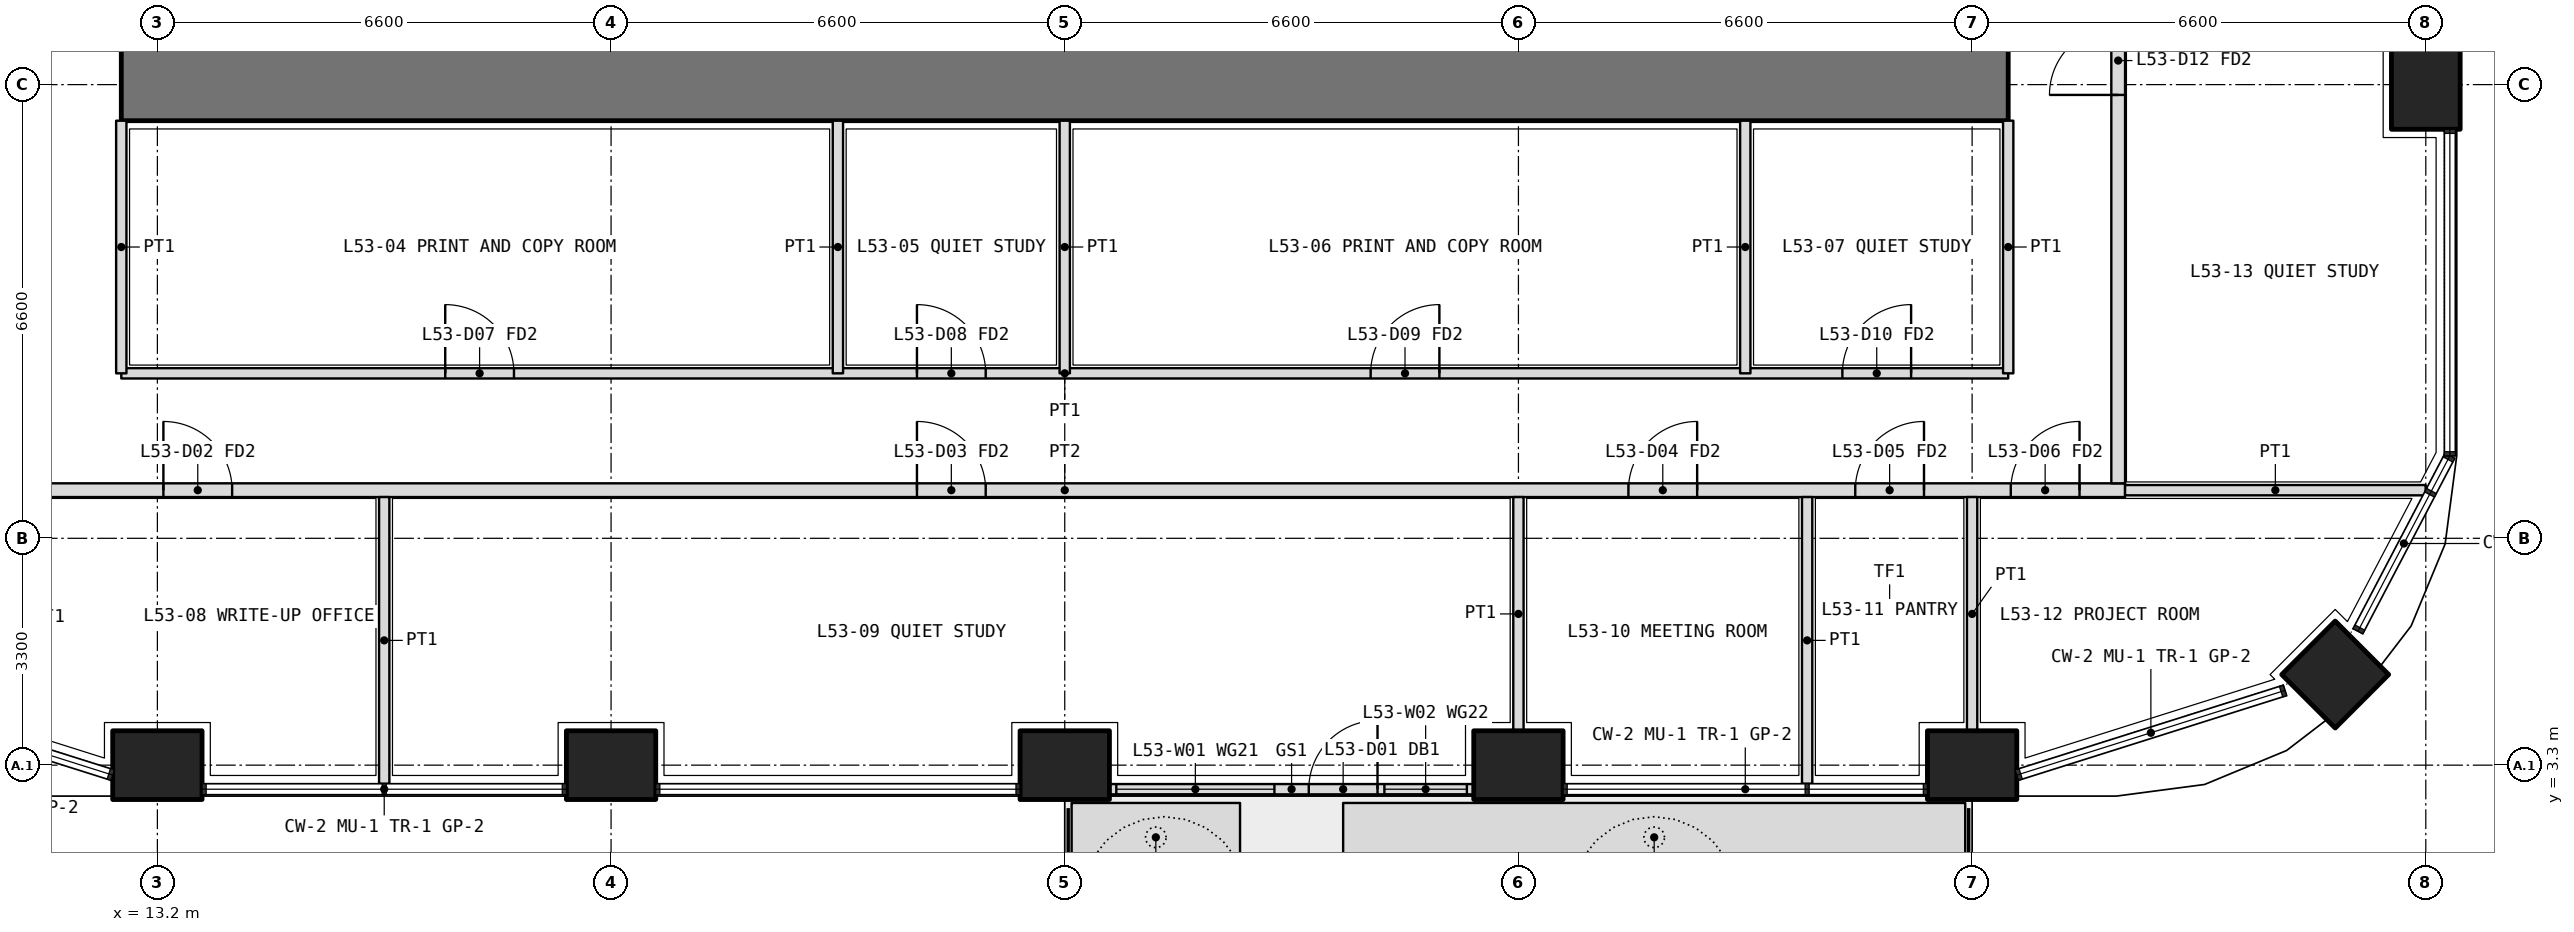
"""IFC4 building model, lengths in metres.
Left out: names, types, materials, properties, quantities, classifications, styles, units other than length and angle.
Written with IfcOpenShell. Run it as: python <this file> out.ifc"""

import sys

from ifc_helpers import new_model, si_unit, direction, frame, frame_2d, origin, origin_2d, place, context, subcontext, project, spatial, polyline, rectangle, outline, extrude, element, fill, save


model = new_model("IFC4")
c1 = context("Model", 3, precision=1e-05, world=origin(), true_north=direction((0.0, 1.0)))
c2 = subcontext(c1, "Body", "Model", "MODEL_VIEW")
j1 = project(units=[si_unit("LENGTHUNIT", "METRE"), si_unit("PLANEANGLEUNIT", "RADIAN")], contexts=[c1])
p1 = place(None, origin())
s1 = spatial("IfcSite", under=j1, at=p1, CompositionType="ELEMENT")
p2 = place(p1, origin())
s2 = spatial("IfcBuilding", under=s1, at=p2, CompositionType="ELEMENT")
p3 = place(p2, frame((0.0, 0.0, 233.4)))
s3 = spatial("IfcBuildingStorey", under=s2, at=p3, CompositionType="ELEMENT", Elevation=233.4)
p4 = place(p3, frame((44.882, 4.618, 0.0), z_axis=(0.0, 0.0, 1.0), x_axis=(0.707106781187, 0.707106781187, 0.0)))
e1 = element("IfcColumn", 1, at=p4, inside=s3, PredefinedType="COLUMN", context=c2, shape_type="SweptSolid", body=[
    extrude(rectangle(XDim=1.1, YDim=1.1, at=origin_2d()), origin(), (0.0, 0.0, 1.0), 4.2),
])
for number, where, z_axis, x_axis in (
    (2, (13.2, 3.3, 0.0), (0.0, 0.0, 1.0), (1.0, 0.0, 0.0)),
    (3, (19.8, 3.3, 0.0), (0.0, 0.0, 1.0), (1.0, 0.0, 0.0)),
    (4, (26.4, 3.3, 0.0), (0.0, 0.0, 1.0), (1.0, 0.0, 0.0)),
    (5, (33.0, 3.3, 0.0), (0.0, 0.0, 1.0), (1.0, 0.0, 0.0)),
    (6, (39.6, 3.3, 0.0), (0.0, 0.0, 1.0), (1.0, 0.0, 0.0)),
    (7, (46.2, 13.2, 0.0), (0.0, 0.0, 1.0), (0.0, 1.0, 0.0)),
):
    element("IfcColumn", number, at=place(p3, frame(where, z_axis=z_axis, x_axis=x_axis)), inside=s3, PredefinedType="COLUMN", context=c2, shape_type="SweptSolid", body=[
        extrude(rectangle(XDim=1.3, YDim=1.0, at=origin_2d()), origin(), (0.0, 0.0, 1.0), 4.2),
    ])
p5 = place(p3, origin())
e8 = element("IfcWall", 8, at=p5, inside=s3, PredefinedType="USERDEFINED", context=c2, shape_type="SweptSolid", body=[
    extrude(outline(polyline([(26.5, 1.75), (28.95, 1.75), (28.95, 2.75), (26.5, 2.75), (26.5, 1.75)]), holes=[polyline([(26.65, 1.9), (28.8, 1.9), (28.8, 2.6), (26.65, 2.6), (26.65, 1.9)])]), origin(), (0.0, 0.0, 1.0), 1.05),
])
p6 = place(p3, origin())
e9 = element("IfcWall", 9, at=p6, inside=s3, PredefinedType="USERDEFINED", context=c2, shape_type="SweptSolid", body=[
    extrude(outline(polyline([(30.45, 1.75), (39.5, 1.75), (39.5, 2.75), (30.45, 2.75), (30.45, 1.75)]), holes=[polyline([(30.6, 1.9), (39.35, 1.9), (39.35, 2.6), (30.6, 2.6), (30.6, 1.9)])]), origin(), (0.0, 0.0, 1.0), 1.05),
])
p7 = place(p3, frame((27.05, 2.95, 0.0), z_axis=(0.0, 0.0, 1.0), x_axis=(1.0, 0.0, 0.0)))
e10 = element("IfcWall", 10, at=p7, inside=s3, PredefinedType="SOLIDWALL", context=c2, shape_type="SweptSolid", body=[
    extrude(rectangle(XDim=5.3, YDim=0.15, at=frame_2d((2.65, 0.0))), origin(), (0.0, 0.0, 1.0), 2.7),
])
p8 = place(p7, frame((2.9, 0.0, 0.0)))
e11 = element("IfcOpeningElement", 11, at=p8, cuts=e10, PredefinedType="OPENING", context=c2, shape_type="SweptSolid", body=[
    extrude(rectangle(XDim=1.0, YDim=2.4, at=frame_2d((0.5, 1.2))), frame((0.0, 0.085, 0.0), z_axis=(0.0, -1.0, 0.0), x_axis=(1.0, 0.0, 0.0)), (0.0, 0.0, 1.0), 0.17),
])
p9 = place(p7, frame((0.1, 0.0, 0.1)))
e12 = element("IfcOpeningElement", 12, at=p9, cuts=e10, PredefinedType="OPENING", context=c2, shape_type="SweptSolid", body=[
    extrude(rectangle(XDim=2.3, YDim=2.3, at=frame_2d((1.15, 1.15))), frame((0.0, 0.085, 0.0), z_axis=(0.0, -1.0, 0.0), x_axis=(1.0, 0.0, 0.0)), (0.0, 0.0, 1.0), 0.17),
])
p10 = place(p7, frame((4.0, 0.0, 0.1)))
e13 = element("IfcOpeningElement", 13, at=p10, cuts=e10, PredefinedType="OPENING", context=c2, shape_type="SweptSolid", body=[
    extrude(rectangle(XDim=1.2, YDim=2.3, at=frame_2d((0.6, 1.15))), frame((0.0, 0.085, 0.0), z_axis=(0.0, -1.0, 0.0), x_axis=(1.0, 0.0, 0.0)), (0.0, 0.0, 1.0), 0.17),
])
p11 = place(p3, frame((12.675, 13.2, 0.0), z_axis=(0.0, 0.0, 1.0), x_axis=(1.0, 0.0, 0.0)))
e14 = element("IfcWall", 14, at=p11, inside=s3, PredefinedType="SHEAR", context=c2, shape_type="SweptSolid", body=[
    extrude(rectangle(XDim=27.45, YDim=1.05, at=frame_2d((13.725, 0.0))), origin(), (0.0, 0.0, 1.0), 4.2),
])
p12 = place(p3, frame((12.675, 9.0, 0.0), z_axis=(0.0, 0.0, 1.0), x_axis=(1.0, 0.0, 0.0)))
e15 = element("IfcWall", 15, at=p12, inside=s3, PredefinedType="PARTITIONING", context=c2, shape_type="SweptSolid", body=[
    extrude(rectangle(XDim=27.45, YDim=0.15, at=frame_2d((13.725, 0.0))), origin(), (0.0, 0.0, 1.0), 3.0),
])
p13 = place(p12, frame((4.712, 0.0, 0.0)))
e16 = element("IfcOpeningElement", 16, at=p13, cuts=e15, PredefinedType="OPENING", context=c2, shape_type="SweptSolid", body=[
    extrude(rectangle(XDim=1.0, YDim=2.1, at=frame_2d((0.5, 1.05))), frame((0.0, 0.085, 0.0), z_axis=(0.0, -1.0, 0.0), x_axis=(1.0, 0.0, 0.0)), (0.0, 0.0, 1.0), 0.17),
])
p14 = place(p12, frame((11.575, 0.0, 0.0)))
e17 = element("IfcOpeningElement", 17, at=p14, cuts=e15, PredefinedType="OPENING", context=c2, shape_type="SweptSolid", body=[
    extrude(rectangle(XDim=1.0, YDim=2.1, at=frame_2d((0.5, 1.05))), frame((0.0, 0.085, 0.0), z_axis=(0.0, -1.0, 0.0), x_axis=(1.0, 0.0, 0.0)), (0.0, 0.0, 1.0), 0.17),
])
p15 = place(p12, frame((18.175, 0.0, 0.0)))
e18 = element("IfcOpeningElement", 18, at=p15, cuts=e15, PredefinedType="OPENING", context=c2, shape_type="SweptSolid", body=[
    extrude(rectangle(XDim=1.0, YDim=2.1, at=frame_2d((0.5, 1.05))), frame((0.0, 0.085, 0.0), z_axis=(0.0, -1.0, 0.0), x_axis=(1.0, 0.0, 0.0)), (0.0, 0.0, 1.0), 0.17),
])
p16 = place(p12, frame((25.038, 0.0, 0.0)))
e19 = element("IfcOpeningElement", 19, at=p16, cuts=e15, PredefinedType="OPENING", context=c2, shape_type="SweptSolid", body=[
    extrude(rectangle(XDim=1.0, YDim=2.1, at=frame_2d((0.5, 1.05))), frame((0.0, 0.085, 0.0), z_axis=(0.0, -1.0, 0.0), x_axis=(1.0, 0.0, 0.0)), (0.0, 0.0, 1.0), 0.17),
])
for number, where, z_axis, x_axis in (
    (20, (12.675, 12.675, 0.0), (0.0, 0.0, 1.0), (0.0, -1.0, 0.0)),
    (21, (40.125, 12.675, 0.0), (0.0, 0.0, 1.0), (0.0, -1.0, 0.0)),
):
    element("IfcWall", number, at=place(p3, frame(where, z_axis=z_axis, x_axis=x_axis)), inside=s3, PredefinedType="PARTITIONING", context=c2, shape_type="SweptSolid", body=[
        extrude(rectangle(XDim=3.675, YDim=0.15, at=frame_2d((1.837, 0.0))), origin(), (0.0, 0.0, 1.0), 3.0),
    ])
p17 = place(p3, frame((23.1, 12.675, 0.0), z_axis=(0.0, 0.0, 1.0), x_axis=(0.0, -1.0, 0.0)))
e22 = element("IfcWall", 22, at=p17, inside=s3, PredefinedType="PARTITIONING", context=c2, shape_type="SweptSolid", body=[
    extrude(rectangle(XDim=3.675, YDim=0.15, at=frame_2d((1.837, 0.0))), origin(), (0.0, 0.0, 1.0), 3.9),
])
p18 = place(p3, frame((26.4, 12.675, 0.0), z_axis=(0.0, 0.0, 1.0), x_axis=(0.0, -1.0, 0.0)))
e23 = element("IfcWall", 23, at=p18, inside=s3, PredefinedType="PARTITIONING", context=c2, shape_type="SweptSolid", body=[
    extrude(rectangle(XDim=3.675, YDim=0.15, at=frame_2d((1.837, 0.0))), origin(), (0.0, 0.0, 1.0), 3.0),
])
p19 = place(p3, frame((36.3, 12.675, 0.0), z_axis=(0.0, 0.0, 1.0), x_axis=(0.0, -1.0, 0.0)))
e24 = element("IfcWall", 24, at=p19, inside=s3, PredefinedType="PARTITIONING", context=c2, shape_type="SweptSolid", body=[
    extrude(rectangle(XDim=3.675, YDim=0.15, at=frame_2d((1.837, 0.0))), origin(), (0.0, 0.0, 1.0), 3.9),
])
p20 = place(p3, frame((10.975, 7.3, 0.0), z_axis=(0.0, 0.0, 1.0), x_axis=(1.0, 0.0, 0.0)))
e25 = element("IfcWall", 25, at=p20, inside=s3, PredefinedType="PARTITIONING", context=c2, shape_type="SweptSolid", body=[
    extrude(rectangle(XDim=30.85, YDim=0.2, at=frame_2d((15.425, 0.0))), origin(), (0.0, 0.0, 1.0), 3.0),
])
p21 = place(p20, frame((2.312, 0.0, 0.0)))
e26 = element("IfcOpeningElement", 26, at=p21, cuts=e25, PredefinedType="OPENING", context=c2, shape_type="SweptSolid", body=[
    extrude(rectangle(XDim=1.0, YDim=2.1, at=frame_2d((0.5, 1.05))), frame((0.0, 0.11, 0.0), z_axis=(0.0, -1.0, 0.0), x_axis=(1.0, 0.0, 0.0)), (0.0, 0.0, 1.0), 0.22),
])
p22 = place(p20, frame((13.275, 0.0, 0.0)))
e27 = element("IfcOpeningElement", 27, at=p22, cuts=e25, PredefinedType="OPENING", context=c2, shape_type="SweptSolid", body=[
    extrude(rectangle(XDim=1.0, YDim=2.1, at=frame_2d((0.5, 1.05))), frame((0.0, 0.11, 0.0), z_axis=(0.0, -1.0, 0.0), x_axis=(1.0, 0.0, 0.0)), (0.0, 0.0, 1.0), 0.22),
])
p23 = place(p20, frame((23.625, 0.0, 0.0)))
e28 = element("IfcOpeningElement", 28, at=p23, cuts=e25, PredefinedType="OPENING", context=c2, shape_type="SweptSolid", body=[
    extrude(rectangle(XDim=1.0, YDim=2.1, at=frame_2d((0.5, 1.05))), frame((0.0, 0.11, 0.0), z_axis=(0.0, -1.0, 0.0), x_axis=(1.0, 0.0, 0.0)), (0.0, 0.0, 1.0), 0.22),
])
p24 = place(p20, frame((26.925, 0.0, 0.0)))
e29 = element("IfcOpeningElement", 29, at=p24, cuts=e25, PredefinedType="OPENING", context=c2, shape_type="SweptSolid", body=[
    extrude(rectangle(XDim=1.0, YDim=2.1, at=frame_2d((0.5, 1.05))), frame((0.0, 0.11, 0.0), z_axis=(0.0, -1.0, 0.0), x_axis=(1.0, 0.0, 0.0)), (0.0, 0.0, 1.0), 0.22),
])
p25 = place(p20, frame((29.188, 0.0, 0.0)))
e30 = element("IfcOpeningElement", 30, at=p25, cuts=e25, PredefinedType="OPENING", context=c2, shape_type="SweptSolid", body=[
    extrude(rectangle(XDim=1.0, YDim=2.1, at=frame_2d((0.5, 1.05))), frame((0.0, 0.11, 0.0), z_axis=(0.0, -1.0, 0.0), x_axis=(1.0, 0.0, 0.0)), (0.0, 0.0, 1.0), 0.22),
])
p26 = place(p3, frame((41.725, 7.4, 0.0), z_axis=(0.0, 0.0, 1.0), x_axis=(0.0, 1.0, 0.0)))
e31 = element("IfcWall", 31, at=p26, inside=s3, PredefinedType="PARTITIONING", context=c2, shape_type="SweptSolid", body=[
    extrude(rectangle(XDim=31.4, YDim=0.2, at=frame_2d((15.7, 0.0))), origin(), (0.0, 0.0, 1.0), 3.0),
])
p27 = place(p26, frame((5.65, 0.0, 0.0)))
e32 = element("IfcOpeningElement", 32, at=p27, cuts=e31, PredefinedType="OPENING", context=c2, shape_type="SweptSolid", body=[
    extrude(rectangle(XDim=1.0, YDim=2.1, at=frame_2d((0.5, 1.05))), frame((0.0, 0.11, 0.0), z_axis=(0.0, -1.0, 0.0), x_axis=(1.0, 0.0, 0.0)), (0.0, 0.0, 1.0), 0.22),
])
p28 = place(p26, frame((13.4, 0.0, 0.0)))
e33 = element("IfcOpeningElement", 33, at=p28, cuts=e31, PredefinedType="OPENING", context=c2, shape_type="SweptSolid", body=[
    extrude(rectangle(XDim=1.0, YDim=2.1, at=frame_2d((0.5, 1.05))), frame((0.0, 0.11, 0.0), z_axis=(0.0, -1.0, 0.0), x_axis=(1.0, 0.0, 0.0)), (0.0, 0.0, 1.0), 0.22),
])
p29 = place(p26, frame((16.75, 0.0, 0.0)))
e34 = element("IfcOpeningElement", 34, at=p29, cuts=e31, PredefinedType="OPENING", context=c2, shape_type="SweptSolid", body=[
    extrude(rectangle(XDim=0.9, YDim=2.1, at=frame_2d((0.45, 1.05))), frame((0.0, 0.11, 0.0), z_axis=(0.0, -1.0, 0.0), x_axis=(1.0, 0.0, 0.0)), (0.0, 0.0, 1.0), 0.22),
])
p30 = place(p26, frame((20.15, 0.0, 0.0)))
e35 = element("IfcOpeningElement", 35, at=p30, cuts=e31, PredefinedType="OPENING", context=c2, shape_type="SweptSolid", body=[
    extrude(rectangle(XDim=1.0, YDim=2.1, at=frame_2d((0.5, 1.05))), frame((0.0, 0.11, 0.0), z_axis=(0.0, -1.0, 0.0), x_axis=(1.0, 0.0, 0.0)), (0.0, 0.0, 1.0), 0.22),
])
p31 = place(p26, frame((26.4, 0.0, 0.0)))
e36 = element("IfcOpeningElement", 36, at=p31, cuts=e31, PredefinedType="OPENING", context=c2, shape_type="SweptSolid", body=[
    extrude(rectangle(XDim=1.0, YDim=2.1, at=frame_2d((0.5, 1.05))), frame((0.0, 0.11, 0.0), z_axis=(0.0, -1.0, 0.0), x_axis=(1.0, 0.0, 0.0)), (0.0, 0.0, 1.0), 0.22),
])
p32 = place(p3, frame((46.198, 7.3, 0.0), z_axis=(0.0, 0.0, 1.0), x_axis=(-1.0, 0.0, 0.0)))
e37 = element("IfcWall", 37, at=p32, inside=s3, PredefinedType="PARTITIONING", context=c2, shape_type="SweptSolid", body=[
    extrude(rectangle(XDim=4.373, YDim=0.15, at=frame_2d((2.186, 0.0))), origin(), (0.0, 0.0, 1.0), 2.7),
])
for number, where, z_axis, x_axis in (
    (38, (37.2, 3.03, 0.0), (0.0, 0.0, 1.0), (0.0, 1.0, 0.0)),
    (39, (16.5, 3.03, 0.0), (0.0, 0.0, 1.0), (0.0, 1.0, 0.0)),
):
    element("IfcWall", number, at=place(p3, frame(where, z_axis=z_axis, x_axis=x_axis)), inside=s3, PredefinedType="PARTITIONING", context=c2, shape_type="SweptSolid", body=[
        extrude(rectangle(XDim=4.17, YDim=0.15, at=frame_2d((2.085, 0.0))), origin(), (0.0, 0.0, 1.0), 2.7),
    ])
for number, where, z_axis, x_axis in (
    (40, (33.0, 3.8, 0.0), (0.0, 0.0, 1.0), (0.0, 1.0, 0.0)),
    (41, (39.6, 3.8, 0.0), (0.0, 0.0, 1.0), (0.0, 1.0, 0.0)),
):
    element("IfcWall", number, at=place(p3, frame(where, z_axis=z_axis, x_axis=x_axis)), inside=s3, PredefinedType="PARTITIONING", context=c2, shape_type="SweptSolid", body=[
        extrude(rectangle(XDim=3.4, YDim=0.15, at=frame_2d((1.7, 0.0))), origin(), (0.0, 0.0, 1.0), 3.0),
    ])
p33 = place(p8, origin())
e42 = element("IfcDoor", 42, at=p33, inside=s3, OperationType="SINGLE_SWING_RIGHT", PredefinedType="DOOR", context=c2, shape_type="SweptSolid", body=[
    extrude(rectangle(XDim=1.0, YDim=2.4, at=frame_2d((0.5, 1.2))), frame((0.0, 0.025, 0.0), z_axis=(0.0, -1.0, 0.0), x_axis=(1.0, 0.0, 0.0)), (0.0, 0.0, 1.0), 0.05),
])
fill(e11, e42)
p34 = place(p9, origin())
e43 = element("IfcWindow", 43, at=p34, inside=s3, PartitioningType="SINGLE_PANEL", PredefinedType="WINDOW", context=c2, shape_type="SweptSolid", body=[
    extrude(rectangle(XDim=2.3, YDim=2.3, at=frame_2d((1.15, 1.15))), frame((0.0, 0.03, 0.0), z_axis=(0.0, -1.0, 0.0), x_axis=(1.0, 0.0, 0.0)), (0.0, 0.0, 1.0), 0.06),
])
fill(e12, e43)
p35 = place(p10, origin())
e44 = element("IfcWindow", 44, at=p35, inside=s3, PartitioningType="SINGLE_PANEL", PredefinedType="WINDOW", context=c2, shape_type="SweptSolid", body=[
    extrude(rectangle(XDim=1.2, YDim=2.3, at=frame_2d((0.6, 1.15))), frame((0.0, 0.03, 0.0), z_axis=(0.0, -1.0, 0.0), x_axis=(1.0, 0.0, 0.0)), (0.0, 0.0, 1.0), 0.06),
])
fill(e13, e44)
p36 = place(p13, origin())
e45 = element("IfcDoor", 45, at=p36, inside=s3, OperationType="SINGLE_SWING_LEFT", PredefinedType="DOOR", context=c2, shape_type="SweptSolid", body=[
    extrude(rectangle(XDim=1.0, YDim=2.1, at=frame_2d((0.5, 1.05))), frame((0.0, 0.025, 0.0), z_axis=(0.0, -1.0, 0.0), x_axis=(1.0, 0.0, 0.0)), (0.0, 0.0, 1.0), 0.05),
])
fill(e16, e45)
p37 = place(p14, origin())
e46 = element("IfcDoor", 46, at=p37, inside=s3, OperationType="SINGLE_SWING_LEFT", PredefinedType="DOOR", context=c2, shape_type="SweptSolid", body=[
    extrude(rectangle(XDim=1.0, YDim=2.1, at=frame_2d((0.5, 1.05))), frame((0.0, 0.025, 0.0), z_axis=(0.0, -1.0, 0.0), x_axis=(1.0, 0.0, 0.0)), (0.0, 0.0, 1.0), 0.05),
])
fill(e17, e46)
p38 = place(p15, origin())
e47 = element("IfcDoor", 47, at=p38, inside=s3, OperationType="SINGLE_SWING_RIGHT", PredefinedType="DOOR", context=c2, shape_type="SweptSolid", body=[
    extrude(rectangle(XDim=1.0, YDim=2.1, at=frame_2d((0.5, 1.05))), frame((0.0, 0.025, 0.0), z_axis=(0.0, -1.0, 0.0), x_axis=(1.0, 0.0, 0.0)), (0.0, 0.0, 1.0), 0.05),
])
fill(e18, e47)
p39 = place(p16, origin())
e48 = element("IfcDoor", 48, at=p39, inside=s3, OperationType="SINGLE_SWING_RIGHT", PredefinedType="DOOR", context=c2, shape_type="SweptSolid", body=[
    extrude(rectangle(XDim=1.0, YDim=2.1, at=frame_2d((0.5, 1.05))), frame((0.0, 0.025, 0.0), z_axis=(0.0, -1.0, 0.0), x_axis=(1.0, 0.0, 0.0)), (0.0, 0.0, 1.0), 0.05),
])
fill(e19, e48)
p40 = place(p21, origin())
e49 = element("IfcDoor", 49, at=p40, inside=s3, OperationType="SINGLE_SWING_LEFT", PredefinedType="DOOR", context=c2, shape_type="SweptSolid", body=[
    extrude(rectangle(XDim=1.0, YDim=2.1, at=frame_2d((0.5, 1.05))), frame((0.0, 0.025, 0.0), z_axis=(0.0, -1.0, 0.0), x_axis=(1.0, 0.0, 0.0)), (0.0, 0.0, 1.0), 0.05),
])
fill(e26, e49)
p41 = place(p22, origin())
e50 = element("IfcDoor", 50, at=p41, inside=s3, OperationType="SINGLE_SWING_LEFT", PredefinedType="DOOR", context=c2, shape_type="SweptSolid", body=[
    extrude(rectangle(XDim=1.0, YDim=2.1, at=frame_2d((0.5, 1.05))), frame((0.0, 0.025, 0.0), z_axis=(0.0, -1.0, 0.0), x_axis=(1.0, 0.0, 0.0)), (0.0, 0.0, 1.0), 0.05),
])
fill(e27, e50)
p42 = place(p23, origin())
e51 = element("IfcDoor", 51, at=p42, inside=s3, OperationType="SINGLE_SWING_RIGHT", PredefinedType="DOOR", context=c2, shape_type="SweptSolid", body=[
    extrude(rectangle(XDim=1.0, YDim=2.1, at=frame_2d((0.5, 1.05))), frame((0.0, 0.025, 0.0), z_axis=(0.0, -1.0, 0.0), x_axis=(1.0, 0.0, 0.0)), (0.0, 0.0, 1.0), 0.05),
])
fill(e28, e51)
p43 = place(p24, origin())
e52 = element("IfcDoor", 52, at=p43, inside=s3, OperationType="SINGLE_SWING_RIGHT", PredefinedType="DOOR", context=c2, shape_type="SweptSolid", body=[
    extrude(rectangle(XDim=1.0, YDim=2.1, at=frame_2d((0.5, 1.05))), frame((0.0, 0.025, 0.0), z_axis=(0.0, -1.0, 0.0), x_axis=(1.0, 0.0, 0.0)), (0.0, 0.0, 1.0), 0.05),
])
fill(e29, e52)
p44 = place(p25, origin())
e53 = element("IfcDoor", 53, at=p44, inside=s3, OperationType="SINGLE_SWING_RIGHT", PredefinedType="DOOR", context=c2, shape_type="SweptSolid", body=[
    extrude(rectangle(XDim=1.0, YDim=2.1, at=frame_2d((0.5, 1.05))), frame((0.0, 0.025, 0.0), z_axis=(0.0, -1.0, 0.0), x_axis=(1.0, 0.0, 0.0)), (0.0, 0.0, 1.0), 0.05),
])
fill(e30, e53)
p45 = place(p27, origin())
e54 = element("IfcDoor", 54, at=p45, inside=s3, OperationType="SINGLE_SWING_LEFT", PredefinedType="DOOR", context=c2, shape_type="SweptSolid", body=[
    extrude(rectangle(XDim=1.0, YDim=2.1, at=frame_2d((0.5, 1.05))), frame((0.0, 0.025, 0.0), z_axis=(0.0, -1.0, 0.0), x_axis=(1.0, 0.0, 0.0)), (0.0, 0.0, 1.0), 0.05),
])
fill(e32, e54)
save(model, sys.argv[1])
